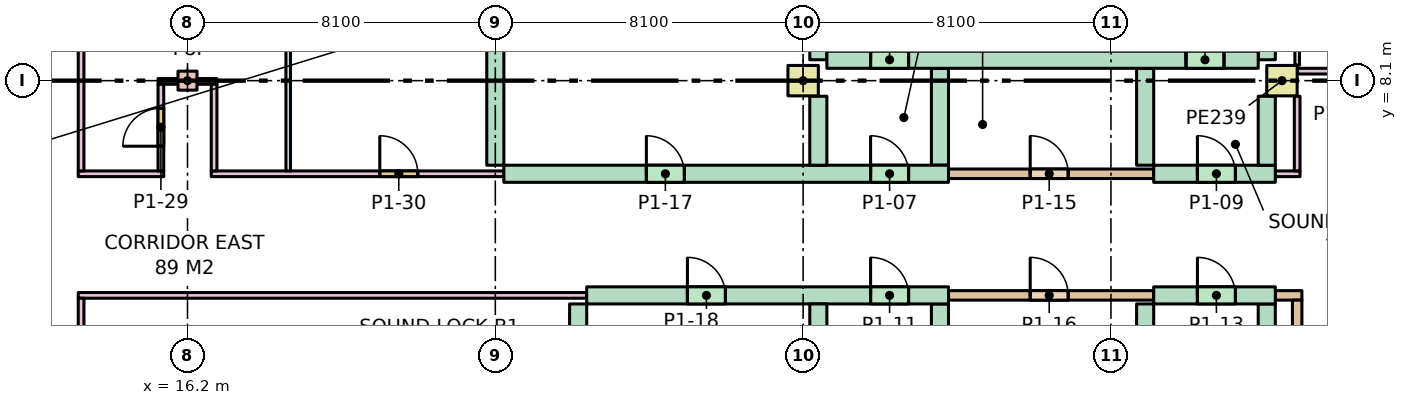
"""IFC4 building model, lengths in metres.
Left out: names, types, materials, properties, quantities, classifications, styles, units other than length and angle.
Written with IfcOpenShell. Run it as: python <this file> out.ifc"""

import sys

from ifc_helpers import new_model, si_unit, direction, frame, frame_2d, origin, origin_2d, place, context, subcontext, project, spatial, rectangle, extrude, element, fill, save


model = new_model("IFC4")
c1 = context("Model", 3, precision=1e-05, world=origin(), true_north=direction((0.0, 1.0)))
c2 = subcontext(c1, "Body", "Model", "MODEL_VIEW")
j1 = project(units=[si_unit("LENGTHUNIT", "METRE"), si_unit("PLANEANGLEUNIT", "RADIAN")], contexts=[c1])
p1 = place(None, origin())
s1 = spatial("IfcSite", under=j1, at=p1, CompositionType="ELEMENT")
p2 = place(p1, origin())
s2 = spatial("IfcBuilding", under=s1, at=p2, CompositionType="ELEMENT")
p3 = place(p2, frame((0.0, 0.0, 6.0)))
s3 = spatial("IfcBuildingStorey", under=s2, at=p3, CompositionType="ELEMENT", Elevation=6.0)
p4 = place(p3, frame((16.2, 8.1, 0.0), z_axis=(0.0, 0.0, 1.0), x_axis=(1.0, 0.0, 0.0)))
e1 = element("IfcColumn", 1, at=p4, inside=s3, PredefinedType="COLUMN", context=c2, shape_type="SweptSolid", body=[
    extrude(rectangle(XDim=0.5, YDim=0.5, at=origin_2d()), origin(), (0.0, 0.0, 1.0), 7.0),
])
for number, where, z_axis, x_axis in (
    (2, (32.4, 8.1, 0.0), (0.0, 0.0, 1.0), (1.0, 0.0, 0.0)),
    (3, (45.0, 8.1, 0.0), (0.0, 0.0, 1.0), (1.0, 0.0, 0.0)),
):
    element("IfcColumn", number, at=place(p3, frame(where, z_axis=z_axis, x_axis=x_axis)), inside=s3, PredefinedType="COLUMN", context=c2, shape_type="SweptSolid", body=[
        extrude(rectangle(XDim=0.8, YDim=0.8, at=origin_2d()), origin(), (0.0, 0.0, 1.0), 7.0),
    ])
p5 = place(p3, frame((36.225, 5.65, 0.0), z_axis=(0.0, 0.0, 1.0), x_axis=(1.0, 0.0, 0.0)))
e4 = element("IfcWall", 4, at=p5, inside=s3, PredefinedType="PARTITIONING", context=c2, shape_type="SweptSolid", body=[
    extrude(rectangle(XDim=5.4, YDim=0.25, at=frame_2d((2.7, 0.0))), origin(), (0.0, 0.0, 1.0), 6.68),
])
p6 = place(p5, frame((2.15, 0.0, 0.0)))
e5 = element("IfcOpeningElement", 5, at=p6, cuts=e4, PredefinedType="OPENING", context=c2, shape_type="SweptSolid", body=[
    extrude(rectangle(XDim=1.0, YDim=2.1, at=frame_2d((0.5, 1.05))), frame((0.0, 0.135, 0.0), z_axis=(0.0, -1.0, 0.0), x_axis=(1.0, 0.0, 0.0)), (0.0, 0.0, 1.0), 0.27),
])
for number, where, z_axis, x_axis in (
    (6, (36.0, 5.875, 0.0), (0.0, 0.0, 1.0), (0.0, 1.0, 0.0)),
    (7, (41.4, 5.875, 0.0), (0.0, 0.0, 1.0), (0.0, 1.0, 0.0)),
):
    element("IfcWall", number, at=place(p3, frame(where, z_axis=z_axis, x_axis=x_axis)), inside=s3, PredefinedType="PARTITIONING", context=c2, shape_type="SweptSolid", body=[
        extrude(rectangle(XDim=2.55, YDim=0.45, at=frame_2d((1.275, 0.0))), origin(), (0.0, 0.0, 1.0), 6.68),
    ])
p7 = place(p3, frame((36.225, 2.45, 0.0), z_axis=(0.0, 0.0, 1.0), x_axis=(1.0, 0.0, 0.0)))
e8 = element("IfcWall", 8, at=p7, inside=s3, PredefinedType="PARTITIONING", context=c2, shape_type="SweptSolid", body=[
    extrude(rectangle(XDim=5.4, YDim=0.25, at=frame_2d((2.7, 0.0))), origin(), (0.0, 0.0, 1.0), 6.68),
])
p8 = place(p7, frame((2.15, 0.0, 0.0)))
e9 = element("IfcOpeningElement", 9, at=p8, cuts=e8, PredefinedType="OPENING", context=c2, shape_type="SweptSolid", body=[
    extrude(rectangle(XDim=1.0, YDim=2.1, at=frame_2d((0.5, 1.05))), frame((0.0, 0.135, 0.0), z_axis=(0.0, -1.0, 0.0), x_axis=(1.0, 0.0, 0.0)), (0.0, 0.0, 1.0), 0.27),
])
for number, where, z_axis, x_axis in (
    (10, (36.0, -0.325, 0.0), (0.0, 0.0, 1.0), (0.0, 1.0, 0.0)),
    (11, (41.4, -0.325, 0.0), (0.0, 0.0, 1.0), (0.0, 1.0, 0.0)),
):
    element("IfcWall", number, at=place(p3, frame(where, z_axis=z_axis, x_axis=x_axis)), inside=s3, PredefinedType="PARTITIONING", context=c2, shape_type="SweptSolid", body=[
        extrude(rectangle(XDim=2.55, YDim=0.45, at=frame_2d((1.275, 0.0))), origin(), (0.0, 0.0, 1.0), 6.68),
    ])
p9 = place(p3, frame((44.825, 2.45, 0.0), z_axis=(0.0, 0.0, 1.0), x_axis=(1.0, 0.0, 0.0)))
e12 = element("IfcWall", 12, at=p9, inside=s3, PredefinedType="PARTITIONING", context=c2, shape_type="SweptSolid", body=[
    extrude(rectangle(XDim=0.7, YDim=0.25, at=frame_2d((0.35, 0.0))), origin(), (0.0, 0.0, 1.0), 6.68),
])
p10 = place(p3, frame((44.6, 0.41, 0.0), z_axis=(0.0, 0.0, 1.0), x_axis=(0.0, 1.0, 0.0)))
e13 = element("IfcWall", 13, at=p10, inside=s3, PredefinedType="PARTITIONING", context=c2, shape_type="SweptSolid", body=[
    extrude(rectangle(XDim=1.815, YDim=0.45, at=frame_2d((0.908, 0.0))), origin(), (0.0, 0.0, 1.0), 6.68),
])
p11 = place(p3, frame((45.4, 0.41, 0.0), z_axis=(0.0, 0.0, 1.0), x_axis=(0.0, 1.0, 0.0)))
e14 = element("IfcWall", 14, at=p11, inside=s3, PredefinedType="PARTITIONING", context=c2, shape_type="SweptSolid", body=[
    extrude(rectangle(XDim=1.915, YDim=0.25, at=frame_2d((0.958, 0.0))), origin(), (0.0, 0.0, 1.0), 6.68),
])
p12 = place(p3, frame((24.3, 5.875, 0.0), z_axis=(0.0, 0.0, 1.0), x_axis=(0.0, 1.0, 0.0)))
e15 = element("IfcWall", 15, at=p12, inside=s3, PredefinedType="PARTITIONING", context=c2, shape_type="SweptSolid", body=[
    extrude(rectangle(XDim=10.065, YDim=0.45, at=frame_2d((5.032, 0.0))), origin(), (0.0, 0.0, 1.0), 6.68),
])
p13 = place(p3, frame((24.525, 5.65, 0.0), z_axis=(0.0, 0.0, 1.0), x_axis=(1.0, 0.0, 0.0)))
e16 = element("IfcWall", 16, at=p13, inside=s3, PredefinedType="PARTITIONING", context=c2, shape_type="SweptSolid", body=[
    extrude(rectangle(XDim=11.7, YDim=0.45, at=frame_2d((5.85, 0.0))), origin(), (0.0, 0.0, 1.0), 6.68),
])
p14 = place(p13, frame((9.65, 0.0, 0.0)))
e17 = element("IfcOpeningElement", 17, at=p14, cuts=e16, PredefinedType="OPENING", context=c2, shape_type="SweptSolid", body=[
    extrude(rectangle(XDim=1.0, YDim=2.1, at=frame_2d((0.5, 1.05))), frame((0.0, 0.235, 0.0), z_axis=(0.0, -1.0, 0.0), x_axis=(1.0, 0.0, 0.0)), (0.0, 0.0, 1.0), 0.47),
])
p15 = place(p13, frame((3.75, 0.0, 0.0)))
e18 = element("IfcOpeningElement", 18, at=p15, cuts=e16, PredefinedType="OPENING", context=c2, shape_type="SweptSolid", body=[
    extrude(rectangle(XDim=1.0, YDim=2.1, at=frame_2d((0.5, 1.05))), frame((0.0, 0.235, 0.0), z_axis=(0.0, -1.0, 0.0), x_axis=(1.0, 0.0, 0.0)), (0.0, 0.0, 1.0), 0.47),
])
p16 = place(p3, frame((32.8, 5.875, 0.0), z_axis=(0.0, 0.0, 1.0), x_axis=(0.0, 1.0, 0.0)))
e19 = element("IfcWall", 19, at=p16, inside=s3, PredefinedType="PARTITIONING", context=c2, shape_type="SweptSolid", body=[
    extrude(rectangle(XDim=1.815, YDim=0.45, at=frame_2d((0.907, 0.0))), origin(), (0.0, 0.0, 1.0), 6.68),
])
p17 = place(p3, frame((32.8, 8.65, 0.0), z_axis=(0.0, 0.0, 1.0), x_axis=(0.0, 1.0, 0.0)))
e20 = element("IfcWall", 20, at=p17, inside=s3, PredefinedType="PARTITIONING", context=c2, shape_type="SweptSolid", body=[
    extrude(rectangle(XDim=7.14, YDim=0.45, at=frame_2d((3.57, 0.0))), origin(), (0.0, 0.0, 1.0), 6.68),
])
p18 = place(p3, frame((26.705, 2.45, 0.0), z_axis=(0.0, 0.0, 1.0), x_axis=(1.0, 0.0, 0.0)))
e21 = element("IfcWall", 21, at=p18, inside=s3, PredefinedType="PARTITIONING", context=c2, shape_type="SweptSolid", body=[
    extrude(rectangle(XDim=9.52, YDim=0.45, at=frame_2d((4.76, 0.0))), origin(), (0.0, 0.0, 1.0), 6.68),
])
p19 = place(p18, frame((7.47, 0.0, 0.0)))
e22 = element("IfcOpeningElement", 22, at=p19, cuts=e21, PredefinedType="OPENING", context=c2, shape_type="SweptSolid", body=[
    extrude(rectangle(XDim=1.0, YDim=2.1, at=frame_2d((0.5, 1.05))), frame((0.0, 0.235, 0.0), z_axis=(0.0, -1.0, 0.0), x_axis=(1.0, 0.0, 0.0)), (0.0, 0.0, 1.0), 0.47),
])
p20 = place(p18, frame((2.65, 0.0, 0.0)))
e23 = element("IfcOpeningElement", 23, at=p20, cuts=e21, PredefinedType="OPENING", context=c2, shape_type="SweptSolid", body=[
    extrude(rectangle(XDim=1.0, YDim=2.1, at=frame_2d((0.5, 1.05))), frame((0.0, 0.235, 0.0), z_axis=(0.0, -1.0, 0.0), x_axis=(1.0, 0.0, 0.0)), (0.0, 0.0, 1.0), 0.47),
])
p21 = place(p3, frame((32.8, 0.41, 0.0), z_axis=(0.0, 0.0, 1.0), x_axis=(0.0, 1.0, 0.0)))
e24 = element("IfcWall", 24, at=p21, inside=s3, PredefinedType="PARTITIONING", context=c2, shape_type="SweptSolid", body=[
    extrude(rectangle(XDim=1.815, YDim=0.45, at=frame_2d((0.908, 0.0))), origin(), (0.0, 0.0, 1.0), 6.68),
])
p22 = place(p3, frame((26.48, 0.96, 0.0), z_axis=(0.0, 0.0, 1.0), x_axis=(0.0, 1.0, 0.0)))
e25 = element("IfcWall", 25, at=p22, inside=s3, PredefinedType="PARTITIONING", context=c2, shape_type="SweptSolid", body=[
    extrude(rectangle(XDim=1.265, YDim=0.45, at=frame_2d((0.633, 0.0))), origin(), (0.0, 0.0, 1.0), 6.68),
])
p23 = place(p3, frame((18.85, 5.725, 0.0), z_axis=(0.0, 0.0, 1.0), x_axis=(0.0, 1.0, 0.0)))
e26 = element("IfcWall", 26, at=p23, inside=s3, PredefinedType="PARTITIONING", context=c2, shape_type="SweptSolid", body=[
    extrude(rectangle(XDim=10.415, YDim=0.12, at=frame_2d((5.208, 0.0))), origin(), (0.0, 0.0, 1.0), 6.68),
])
p24 = place(p3, frame((44.825, 5.65, 0.0), z_axis=(0.0, 0.0, 1.0), x_axis=(1.0, 0.0, 0.0)))
e27 = element("IfcWall", 27, at=p24, inside=s3, PredefinedType="PARTITIONING", context=c2, shape_type="SweptSolid", body=[
    extrude(rectangle(XDim=0.65, YDim=0.15, at=frame_2d((0.325, 0.0))), origin(), (0.0, 0.0, 1.0), 6.68),
])
p25 = place(p3, frame((41.625, 5.65, 0.0), z_axis=(0.0, 0.0, 1.0), x_axis=(1.0, 0.0, 0.0)))
e28 = element("IfcWall", 28, at=p25, inside=s3, PredefinedType="PARTITIONING", context=c2, shape_type="SweptSolid", body=[
    extrude(rectangle(XDim=3.2, YDim=0.45, at=frame_2d((1.6, 0.0))), origin(), (0.0, 0.0, 1.0), 6.68),
])
p26 = place(p25, frame((1.15, 0.0, 0.0)))
e29 = element("IfcOpeningElement", 29, at=p26, cuts=e28, PredefinedType="OPENING", context=c2, shape_type="SweptSolid", body=[
    extrude(rectangle(XDim=1.0, YDim=2.1, at=frame_2d((0.5, 1.05))), frame((0.0, 0.235, 0.0), z_axis=(0.0, -1.0, 0.0), x_axis=(1.0, 0.0, 0.0)), (0.0, 0.0, 1.0), 0.47),
])
p27 = place(p3, frame((41.625, 2.45, 0.0), z_axis=(0.0, 0.0, 1.0), x_axis=(1.0, 0.0, 0.0)))
e30 = element("IfcWall", 30, at=p27, inside=s3, PredefinedType="PARTITIONING", context=c2, shape_type="SweptSolid", body=[
    extrude(rectangle(XDim=3.2, YDim=0.45, at=frame_2d((1.6, 0.0))), origin(), (0.0, 0.0, 1.0), 6.68),
])
p28 = place(p27, frame((1.15, 0.0, 0.0)))
e31 = element("IfcOpeningElement", 31, at=p28, cuts=e30, PredefinedType="OPENING", context=c2, shape_type="SweptSolid", body=[
    extrude(rectangle(XDim=1.0, YDim=2.1, at=frame_2d((0.5, 1.05))), frame((0.0, 0.235, 0.0), z_axis=(0.0, -1.0, 0.0), x_axis=(1.0, 0.0, 0.0)), (0.0, 0.0, 1.0), 0.47),
])
p29 = place(p3, frame((13.325, 5.65, 0.0), z_axis=(0.0, 0.0, 1.0), x_axis=(1.0, 0.0, 0.0)))
e32 = element("IfcWall", 32, at=p29, inside=s3, PredefinedType="PARTITIONING", context=c2, shape_type="SweptSolid", body=[
    extrude(rectangle(XDim=2.25, YDim=0.15, at=frame_2d((1.125, 0.0))), origin(), (0.0, 0.0, 1.0), 6.68),
])
p30 = place(p3, frame((16.825, 5.65, 0.0), z_axis=(0.0, 0.0, 1.0), x_axis=(1.0, 0.0, 0.0)))
e33 = element("IfcWall", 33, at=p30, inside=s3, PredefinedType="PARTITIONING", context=c2, shape_type="SweptSolid", body=[
    extrude(rectangle(XDim=7.7, YDim=0.15, at=frame_2d((3.85, 0.0))), origin(), (0.0, 0.0, 1.0), 6.68),
])
p31 = place(p30, frame((4.435, 0.0, 0.0)))
e34 = element("IfcOpeningElement", 34, at=p31, cuts=e33, PredefinedType="OPENING", context=c2, shape_type="SweptSolid", body=[
    extrude(rectangle(XDim=1.0, YDim=2.1, at=frame_2d((0.5, 1.05))), frame((0.0, 0.085, 0.0), z_axis=(0.0, -1.0, 0.0), x_axis=(1.0, 0.0, 0.0)), (0.0, 0.0, 1.0), 0.17),
])
p32 = place(p3, frame((15.425, 8.08, 0.0), z_axis=(0.0, 0.0, 1.0), x_axis=(1.0, 0.0, 0.0)))
e35 = element("IfcWall", 35, at=p32, inside=s3, PredefinedType="PARTITIONING", context=c2, shape_type="SweptSolid", body=[
    extrude(rectangle(XDim=0.515, YDim=0.15, at=frame_2d((0.257, 0.0))), origin(), (0.0, 0.0, 1.0), 6.68),
])
p33 = place(p3, frame((16.46, 8.08, 0.0), z_axis=(0.0, 0.0, 1.0), x_axis=(1.0, 0.0, 0.0)))
e36 = element("IfcWall", 36, at=p33, inside=s3, PredefinedType="PARTITIONING", context=c2, shape_type="SweptSolid", body=[
    extrude(rectangle(XDim=0.515, YDim=0.15, at=frame_2d((0.258, 0.0))), origin(), (0.0, 0.0, 1.0), 6.68),
])
p34 = place(p3, frame((15.5, 5.725, 0.0), z_axis=(0.0, 0.0, 1.0), x_axis=(0.0, 1.0, 0.0)))
e37 = element("IfcWall", 37, at=p34, inside=s3, PredefinedType="PARTITIONING", context=c2, shape_type="SweptSolid", body=[
    extrude(rectangle(XDim=2.28, YDim=0.15, at=frame_2d((1.14, 0.0))), origin(), (0.0, 0.0, 1.0), 6.68),
])
p35 = place(p34, frame((0.65, 0.0, 0.0)))
e38 = element("IfcOpeningElement", 38, at=p35, cuts=e37, PredefinedType="OPENING", context=c2, shape_type="SweptSolid", body=[
    extrude(rectangle(XDim=1.0, YDim=2.1, at=frame_2d((0.5, 1.05))), frame((0.0, 0.085, 0.0), z_axis=(0.0, -1.0, 0.0), x_axis=(1.0, 0.0, 0.0)), (0.0, 0.0, 1.0), 0.17),
])
p36 = place(p3, frame((16.9, 5.725, 0.0), z_axis=(0.0, 0.0, 1.0), x_axis=(0.0, 1.0, 0.0)))
e39 = element("IfcWall", 39, at=p36, inside=s3, PredefinedType="PARTITIONING", context=c2, shape_type="SweptSolid", body=[
    extrude(rectangle(XDim=2.28, YDim=0.15, at=frame_2d((1.14, 0.0))), origin(), (0.0, 0.0, 1.0), 6.68),
])
p37 = place(p3, frame((13.325, 2.45, 0.0), z_axis=(0.0, 0.0, 1.0), x_axis=(1.0, 0.0, 0.0)))
e40 = element("IfcWall", 40, at=p37, inside=s3, PredefinedType="PARTITIONING", context=c2, shape_type="SweptSolid", body=[
    extrude(rectangle(XDim=13.38, YDim=0.15, at=frame_2d((6.69, 0.0))), origin(), (0.0, 0.0, 1.0), 6.68),
])
p38 = place(p3, frame((45.4, 8.51, 0.0), z_axis=(0.0, 0.0, 1.0), x_axis=(0.0, 1.0, 0.0)))
e41 = element("IfcWall", 41, at=p38, inside=s3, PredefinedType="PARTITIONING", context=c2, shape_type="SweptSolid", body=[
    extrude(rectangle(XDim=7.28, YDim=0.12, at=frame_2d((3.64, 0.0))), origin(), (0.0, 0.0, 1.0), 6.68),
])
p39 = place(p3, frame((45.41, 8.35, 0.0), z_axis=(0.0, 0.0, 1.0), x_axis=(1.0, 0.0, 0.0)))
e42 = element("IfcWall", 42, at=p39, inside=s3, PredefinedType="PARTITIONING", context=c2, shape_type="SweptSolid", body=[
    extrude(rectangle(XDim=2.93, YDim=0.15, at=frame_2d((1.465, 0.0))), origin(), (0.0, 0.0, 1.0), 6.68),
])
p40 = place(p39, frame((0.95, 0.0, 0.0)))
e43 = element("IfcOpeningElement", 43, at=p40, cuts=e42, PredefinedType="OPENING", context=c2, shape_type="SweptSolid", body=[
    extrude(rectangle(XDim=1.0, YDim=2.1, at=frame_2d((0.5, 1.05))), frame((0.0, 0.085, 0.0), z_axis=(0.0, -1.0, 0.0), x_axis=(1.0, 0.0, 0.0)), (0.0, 0.0, 1.0), 0.17),
])
p41 = place(p3, frame((44.6, 5.875, 0.0), z_axis=(0.0, 0.0, 1.0), x_axis=(0.0, 1.0, 0.0)))
e44 = element("IfcWall", 44, at=p41, inside=s3, PredefinedType="PARTITIONING", context=c2, shape_type="SweptSolid", body=[
    extrude(rectangle(XDim=1.815, YDim=0.45, at=frame_2d((0.907, 0.0))), origin(), (0.0, 0.0, 1.0), 6.68),
])
p42 = place(p3, frame((45.4, 5.725, 0.0), z_axis=(0.0, 0.0, 1.0), x_axis=(0.0, 1.0, 0.0)))
e45 = element("IfcWall", 45, at=p42, inside=s3, PredefinedType="PARTITIONING", context=c2, shape_type="SweptSolid", body=[
    extrude(rectangle(XDim=1.965, YDim=0.15, at=frame_2d((0.982, 0.0))), origin(), (0.0, 0.0, 1.0), 6.68),
])
p43 = place(p3, frame((44.6, 8.65, 0.0), z_axis=(0.0, 0.0, 1.0), x_axis=(0.0, 1.0, 0.0)))
e46 = element("IfcWall", 46, at=p43, inside=s3, PredefinedType="PARTITIONING", context=c2, shape_type="SweptSolid", body=[
    extrude(rectangle(XDim=7.14, YDim=0.45, at=frame_2d((3.57, 0.0))), origin(), (0.0, 0.0, 1.0), 6.68),
])
p44 = place(p3, frame((33.025, 8.65, 0.0), z_axis=(0.0, 0.0, 1.0), x_axis=(1.0, 0.0, 0.0)))
e47 = element("IfcWall", 47, at=p44, inside=s3, PredefinedType="PARTITIONING", context=c2, shape_type="SweptSolid", body=[
    extrude(rectangle(XDim=11.35, YDim=0.45, at=frame_2d((5.675, 0.0))), origin(), (0.0, 0.0, 1.0), 6.68),
])
p45 = place(p44, frame((1.15, 0.0, 0.0)))
e48 = element("IfcOpeningElement", 48, at=p45, cuts=e47, PredefinedType="OPENING", context=c2, shape_type="SweptSolid", body=[
    extrude(rectangle(XDim=1.0, YDim=2.1, at=frame_2d((0.5, 1.05))), frame((0.0, 0.235, 0.0), z_axis=(0.0, -1.0, 0.0), x_axis=(1.0, 0.0, 0.0)), (0.0, 0.0, 1.0), 0.47),
])
p46 = place(p44, frame((9.45, 0.0, 0.0)))
e49 = element("IfcOpeningElement", 49, at=p46, cuts=e47, PredefinedType="OPENING", context=c2, shape_type="SweptSolid", body=[
    extrude(rectangle(XDim=1.0, YDim=2.1, at=frame_2d((0.5, 1.05))), frame((0.0, 0.235, 0.0), z_axis=(0.0, -1.0, 0.0), x_axis=(1.0, 0.0, 0.0)), (0.0, 0.0, 1.0), 0.47),
])
p47 = place(p3, frame((13.4, 5.725, 0.0), z_axis=(0.0, 0.0, 1.0), x_axis=(0.0, 1.0, 0.0)))
e50 = element("IfcWall", 50, at=p47, inside=s3, PredefinedType="PARTITIONING", context=c2, shape_type="SweptSolid", body=[
    extrude(rectangle(XDim=5.6, YDim=0.15, at=frame_2d((2.8, 0.0))), origin(), (0.0, 0.0, 1.0), 6.68),
])
p48 = place(p3, frame((13.4, -1.675, 0.0), z_axis=(0.0, 0.0, 1.0), x_axis=(0.0, 1.0, 0.0)))
e51 = element("IfcWall", 51, at=p48, inside=s3, PredefinedType="PARTITIONING", context=c2, shape_type="SweptSolid", body=[
    extrude(rectangle(XDim=4.05, YDim=0.15, at=frame_2d((2.025, 0.0))), origin(), (0.0, 0.0, 1.0), 6.68),
])
p49 = place(p14, origin())
e52 = element("IfcDoor", 52, at=p49, inside=s3, OperationType="SINGLE_SWING_LEFT", PredefinedType="DOOR", context=c2, shape_type="SweptSolid", body=[
    extrude(rectangle(XDim=1.0, YDim=2.1, at=frame_2d((0.5, 1.05))), frame((0.0, 0.025, 0.0), z_axis=(0.0, -1.0, 0.0), x_axis=(1.0, 0.0, 0.0)), (0.0, 0.0, 1.0), 0.05),
])
fill(e17, e52)
p50 = place(p45, origin())
e53 = element("IfcDoor", 53, at=p50, inside=s3, OperationType="SINGLE_SWING_LEFT", PredefinedType="DOOR", context=c2, shape_type="SweptSolid", body=[
    extrude(rectangle(XDim=1.0, YDim=2.1, at=frame_2d((0.5, 1.05))), frame((0.0, 0.025, 0.0), z_axis=(0.0, -1.0, 0.0), x_axis=(1.0, 0.0, 0.0)), (0.0, 0.0, 1.0), 0.05),
])
fill(e48, e53)
p51 = place(p26, origin())
e54 = element("IfcDoor", 54, at=p51, inside=s3, OperationType="SINGLE_SWING_LEFT", PredefinedType="DOOR", context=c2, shape_type="SweptSolid", body=[
    extrude(rectangle(XDim=1.0, YDim=2.1, at=frame_2d((0.5, 1.05))), frame((0.0, 0.025, 0.0), z_axis=(0.0, -1.0, 0.0), x_axis=(1.0, 0.0, 0.0)), (0.0, 0.0, 1.0), 0.05),
])
fill(e29, e54)
p52 = place(p46, origin())
e55 = element("IfcDoor", 55, at=p52, inside=s3, OperationType="SINGLE_SWING_LEFT", PredefinedType="DOOR", context=c2, shape_type="SweptSolid", body=[
    extrude(rectangle(XDim=1.0, YDim=2.1, at=frame_2d((0.5, 1.05))), frame((0.0, 0.025, 0.0), z_axis=(0.0, -1.0, 0.0), x_axis=(1.0, 0.0, 0.0)), (0.0, 0.0, 1.0), 0.05),
])
fill(e49, e55)
p53 = place(p19, origin())
e56 = element("IfcDoor", 56, at=p53, inside=s3, OperationType="SINGLE_SWING_LEFT", PredefinedType="DOOR", context=c2, shape_type="SweptSolid", body=[
    extrude(rectangle(XDim=1.0, YDim=2.1, at=frame_2d((0.5, 1.05))), frame((0.0, 0.025, 0.0), z_axis=(0.0, -1.0, 0.0), x_axis=(1.0, 0.0, 0.0)), (0.0, 0.0, 1.0), 0.05),
])
fill(e22, e56)
p54 = place(p28, origin())
e57 = element("IfcDoor", 57, at=p54, inside=s3, OperationType="SINGLE_SWING_LEFT", PredefinedType="DOOR", context=c2, shape_type="SweptSolid", body=[
    extrude(rectangle(XDim=1.0, YDim=2.1, at=frame_2d((0.5, 1.05))), frame((0.0, 0.025, 0.0), z_axis=(0.0, -1.0, 0.0), x_axis=(1.0, 0.0, 0.0)), (0.0, 0.0, 1.0), 0.05),
])
fill(e31, e57)
p55 = place(p6, origin())
e58 = element("IfcDoor", 58, at=p55, inside=s3, OperationType="SINGLE_SWING_LEFT", PredefinedType="DOOR", context=c2, shape_type="SweptSolid", body=[
    extrude(rectangle(XDim=1.0, YDim=2.1, at=frame_2d((0.5, 1.05))), frame((0.0, 0.025, 0.0), z_axis=(0.0, -1.0, 0.0), x_axis=(1.0, 0.0, 0.0)), (0.0, 0.0, 1.0), 0.05),
])
fill(e5, e58)
p56 = place(p8, origin())
e59 = element("IfcDoor", 59, at=p56, inside=s3, OperationType="SINGLE_SWING_LEFT", PredefinedType="DOOR", context=c2, shape_type="SweptSolid", body=[
    extrude(rectangle(XDim=1.0, YDim=2.1, at=frame_2d((0.5, 1.05))), frame((0.0, 0.025, 0.0), z_axis=(0.0, -1.0, 0.0), x_axis=(1.0, 0.0, 0.0)), (0.0, 0.0, 1.0), 0.05),
])
fill(e9, e59)
p57 = place(p15, origin())
e60 = element("IfcDoor", 60, at=p57, inside=s3, OperationType="SINGLE_SWING_LEFT", PredefinedType="DOOR", context=c2, shape_type="SweptSolid", body=[
    extrude(rectangle(XDim=1.0, YDim=2.1, at=frame_2d((0.5, 1.05))), frame((0.0, 0.025, 0.0), z_axis=(0.0, -1.0, 0.0), x_axis=(1.0, 0.0, 0.0)), (0.0, 0.0, 1.0), 0.05),
])
fill(e18, e60)
p58 = place(p20, origin())
e61 = element("IfcDoor", 61, at=p58, inside=s3, OperationType="SINGLE_SWING_LEFT", PredefinedType="DOOR", context=c2, shape_type="SweptSolid", body=[
    extrude(rectangle(XDim=1.0, YDim=2.1, at=frame_2d((0.5, 1.05))), frame((0.0, 0.025, 0.0), z_axis=(0.0, -1.0, 0.0), x_axis=(1.0, 0.0, 0.0)), (0.0, 0.0, 1.0), 0.05),
])
fill(e23, e61)
p59 = place(p35, origin())
e62 = element("IfcDoor", 62, at=p59, inside=s3, OperationType="SINGLE_SWING_LEFT", PredefinedType="DOOR", context=c2, shape_type="SweptSolid", body=[
    extrude(rectangle(XDim=1.0, YDim=2.1, at=frame_2d((0.5, 1.05))), frame((0.0, 0.025, 0.0), z_axis=(0.0, -1.0, 0.0), x_axis=(1.0, 0.0, 0.0)), (0.0, 0.0, 1.0), 0.05),
])
fill(e38, e62)
p60 = place(p31, origin())
e63 = element("IfcDoor", 63, at=p60, inside=s3, OperationType="SINGLE_SWING_LEFT", PredefinedType="DOOR", context=c2, shape_type="SweptSolid", body=[
    extrude(rectangle(XDim=1.0, YDim=2.1, at=frame_2d((0.5, 1.05))), frame((0.0, 0.025, 0.0), z_axis=(0.0, -1.0, 0.0), x_axis=(1.0, 0.0, 0.0)), (0.0, 0.0, 1.0), 0.05),
])
fill(e34, e63)
save(model, sys.argv[1])
